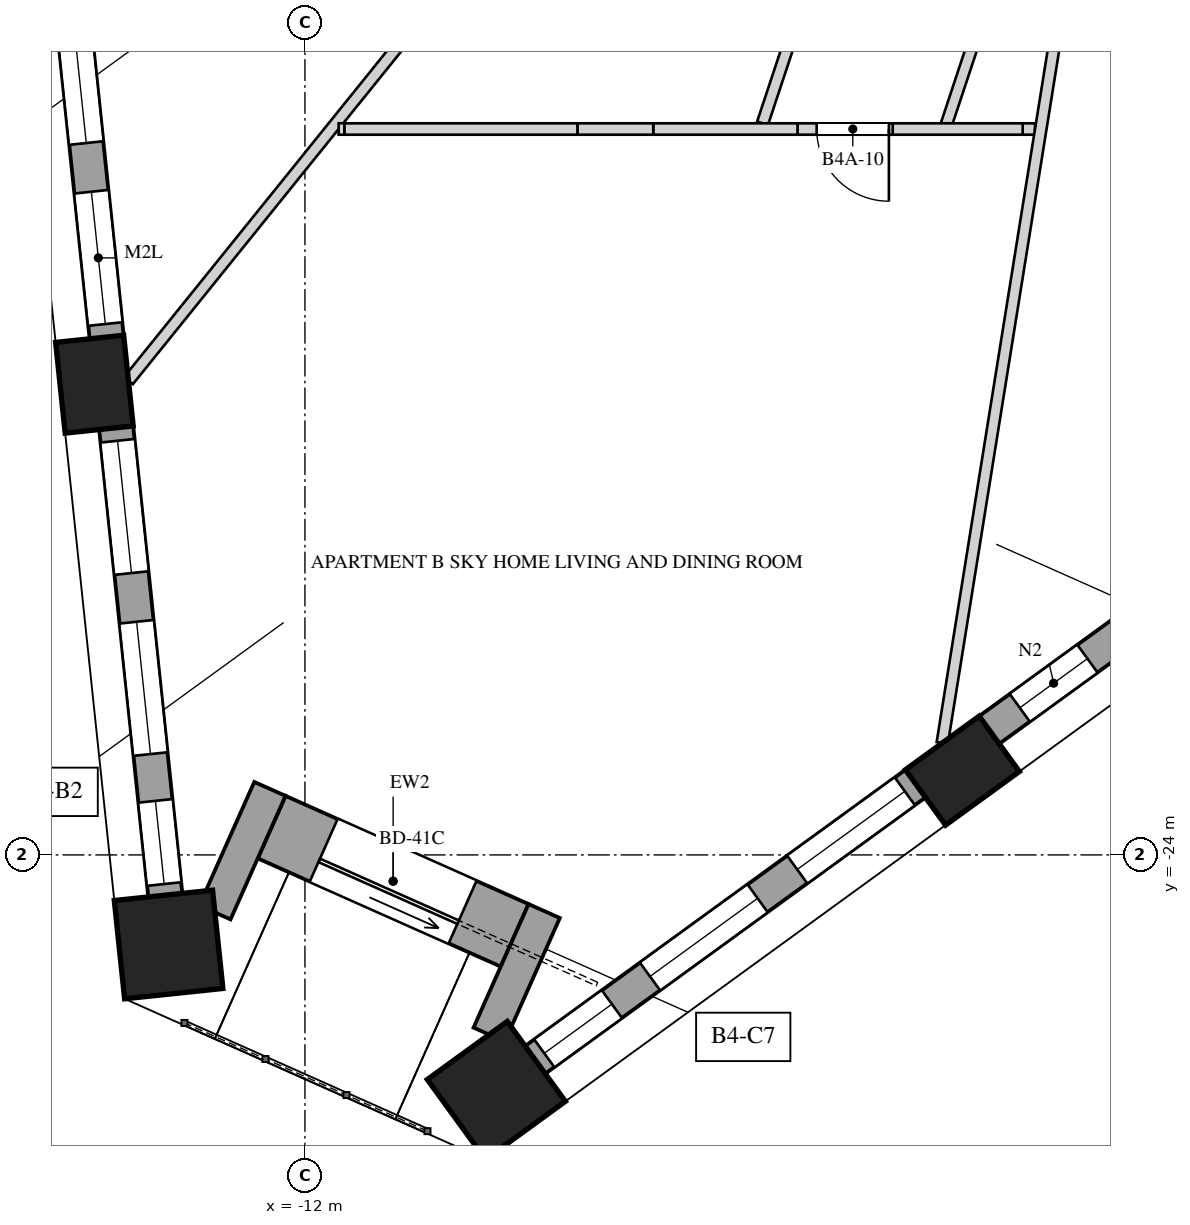
"""IFC4 building model, lengths in metres.
Left out: names, types, materials, properties, quantities, classifications, styles, units other than length and angle.
Written with IfcOpenShell. Run it as: python <this file> out.ifc"""

import sys

from ifc_helpers import new_model, si_unit, direction, frame, frame_2d, origin, origin_2d, place, context, subcontext, project, spatial, polyline, rectangle, outline, extrude, element, fill, save


model = new_model("IFC4")
c1 = context("Model", 3, precision=1e-05, world=origin(), true_north=direction((0.0, 1.0)))
c2 = subcontext(c1, "Body", "Model", "MODEL_VIEW")
j1 = project(units=[si_unit("LENGTHUNIT", "METRE"), si_unit("PLANEANGLEUNIT", "RADIAN")], contexts=[c1])
p1 = place(None, origin())
s1 = spatial("IfcSite", under=j1, at=p1, CompositionType="ELEMENT")
p2 = place(p1, origin())
s2 = spatial("IfcBuilding", under=s1, at=p2, CompositionType="ELEMENT")
p3 = place(p2, frame((0.0, 0.0, 162.8)))
s3 = spatial("IfcBuildingStorey", under=s2, at=p3, CompositionType="ELEMENT", Elevation=162.8)
p4 = place(p3, frame((-14.77, -17.807, -0.35), z_axis=(0.0, 0.0, 1.0), x_axis=(0.104528463268, -0.994521895368, 0.0)))
e1 = element("IfcColumn", 1, at=p4, inside=s3, PredefinedType="COLUMN", context=c2, shape_type="SweptSolid", body=[
    extrude(rectangle(XDim=1.2, YDim=0.9, at=origin_2d()), origin(), (0.0, 0.0, 1.0), 4.35),
])
for number, where, z_axis, x_axis in (
    (2, (-13.794, -25.178, -0.35), (0.0, 0.0, 1.0), (0.105, -0.995, 0.0)),
    (3, (-9.481, -27.098, -0.35), (0.0, 0.0, 1.0), (0.809, 0.588, 0.0)),
):
    element("IfcColumn", number, at=place(p3, frame(where, z_axis=z_axis, x_axis=x_axis)), inside=s3, PredefinedType="COLUMN", context=c2, shape_type="SweptSolid", body=[
        extrude(rectangle(XDim=1.3, YDim=1.3, at=origin_2d()), origin(), (0.0, 0.0, 1.0), 4.35),
    ])
p5 = place(p3, frame((-3.351, -22.891, -0.35), z_axis=(0.0, 0.0, 1.0), x_axis=(0.809016994375, 0.587785252292, 0.0)))
e4 = element("IfcColumn", 4, at=p5, inside=s3, PredefinedType="COLUMN", context=c2, shape_type="SweptSolid", body=[
    extrude(rectangle(XDim=1.2, YDim=0.9, at=origin_2d()), origin(), (0.0, 0.0, 1.0), 4.35),
])
p6 = place(p3, frame((-15.328, -10.342, 0.0), z_axis=(0.0, 0.0, 1.0), x_axis=(0.104531531326, -0.994521572898, 0.0)))
e5 = element("IfcWall", 5, at=p6, inside=s3, PredefinedType="SOLIDWALL", context=c2, shape_type="SweptSolid", body=[
    extrude(rectangle(XDim=6.883, YDim=0.45, at=frame_2d((3.441, 0.0))), origin(), (0.0, 0.0, 1.0), 3.3),
])
p7 = place(p6, frame((0.172, 0.0, 0.5)))
e6 = element("IfcOpeningElement", 6, at=p7, cuts=e5, PredefinedType="OPENING", context=c2, shape_type="SweptSolid", body=[
    extrude(rectangle(XDim=1.75, YDim=2.65, at=frame_2d((0.875, 1.325))), frame((0.0, 0.235, 0.0), z_axis=(0.0, -1.0, 0.0), x_axis=(1.0, 0.0, 0.0)), (0.0, 0.0, 1.0), 0.47),
])
p8 = place(p6, frame((2.566, 0.0, 0.5)))
e7 = element("IfcOpeningElement", 7, at=p8, cuts=e5, PredefinedType="OPENING", context=c2, shape_type="SweptSolid", body=[
    extrude(rectangle(XDim=1.75, YDim=2.65, at=frame_2d((0.875, 1.325))), frame((0.0, 0.235, 0.0), z_axis=(0.0, -1.0, 0.0), x_axis=(1.0, 0.0, 0.0)), (0.0, 0.0, 1.0), 0.47),
])
p9 = place(p6, frame((4.961, 0.0, 0.5)))
e8 = element("IfcOpeningElement", 8, at=p9, cuts=e5, PredefinedType="OPENING", context=c2, shape_type="SweptSolid", body=[
    extrude(rectangle(XDim=1.75, YDim=2.0, at=frame_2d((0.875, 1.0))), frame((0.0, 0.235, 0.0), z_axis=(0.0, -1.0, 0.0), x_axis=(1.0, 0.0, 0.0)), (0.0, 0.0, 1.0), 0.47),
])
p10 = place(p3, frame((-14.483, -18.38, 0.0), z_axis=(0.0, 0.0, 1.0), x_axis=(0.104557348575, -0.994518858976, 0.0)))
e9 = element("IfcWall", 9, at=p10, inside=s3, PredefinedType="SOLIDWALL", context=c2, shape_type="SweptSolid", body=[
    extrude(rectangle(XDim=6.183, YDim=0.45, at=frame_2d((3.092, 0.0))), origin(), (0.0, 0.0, 1.0), 3.3),
])
p11 = place(p10, frame((0.172, 0.0, 0.5)))
e10 = element("IfcOpeningElement", 10, at=p11, cuts=e9, PredefinedType="OPENING", context=c2, shape_type="SweptSolid", body=[
    extrude(rectangle(XDim=1.75, YDim=2.65, at=frame_2d((0.875, 1.325))), frame((0.0, 0.235, 0.0), z_axis=(0.0, -1.0, 0.0), x_axis=(1.0, 0.0, 0.0)), (0.0, 0.0, 1.0), 0.47),
])
p12 = place(p10, frame((2.566, 0.0, 0.5)))
e11 = element("IfcOpeningElement", 11, at=p12, cuts=e9, PredefinedType="OPENING", context=c2, shape_type="SweptSolid", body=[
    extrude(rectangle(XDim=1.75, YDim=2.65, at=frame_2d((0.875, 1.325))), frame((0.0, 0.235, 0.0), z_axis=(0.0, -1.0, 0.0), x_axis=(1.0, 0.0, 0.0)), (0.0, 0.0, 1.0), 0.47),
])
p13 = place(p10, frame((4.936, 0.0, 0.5)))
e12 = element("IfcOpeningElement", 12, at=p13, cuts=e9, PredefinedType="OPENING", context=c2, shape_type="SweptSolid", body=[
    extrude(rectangle(XDim=1.1, YDim=2.0, at=frame_2d((0.55, 1.0))), frame((0.0, 0.235, 0.0), z_axis=(0.0, -1.0, 0.0), x_axis=(1.0, 0.0, 0.0)), (0.0, 0.0, 1.0), 0.47),
])
p14 = place(p3, frame((-8.97, -26.696, 0.0), z_axis=(0.0, 0.0, 1.0), x_axis=(0.809024567544, 0.587774828578, 0.0)))
e13 = element("IfcWall", 13, at=p14, inside=s3, PredefinedType="SOLIDWALL", context=c2, shape_type="SweptSolid", body=[
    extrude(rectangle(XDim=6.183, YDim=0.45, at=frame_2d((3.091, 0.0))), origin(), (0.0, 0.0, 1.0), 3.3),
])
p15 = place(p14, frame((0.147, 0.0, 0.5)))
e14 = element("IfcOpeningElement", 14, at=p15, cuts=e13, PredefinedType="OPENING", context=c2, shape_type="SweptSolid", body=[
    extrude(rectangle(XDim=1.1, YDim=2.0, at=frame_2d((0.55, 1.0))), frame((0.0, 0.235, 0.0), z_axis=(0.0, -1.0, 0.0), x_axis=(1.0, 0.0, 0.0)), (0.0, 0.0, 1.0), 0.47),
])
p16 = place(p14, frame((1.866, 0.0, 0.5)))
e15 = element("IfcOpeningElement", 15, at=p16, cuts=e13, PredefinedType="OPENING", context=c2, shape_type="SweptSolid", body=[
    extrude(rectangle(XDim=1.75, YDim=2.65, at=frame_2d((0.875, 1.325))), frame((0.0, 0.235, 0.0), z_axis=(0.0, -1.0, 0.0), x_axis=(1.0, 0.0, 0.0)), (0.0, 0.0, 1.0), 0.47),
])
p17 = place(p14, frame((4.261, 0.0, 0.5)))
e16 = element("IfcOpeningElement", 16, at=p17, cuts=e13, PredefinedType="OPENING", context=c2, shape_type="SweptSolid", body=[
    extrude(rectangle(XDim=1.75, YDim=2.65, at=frame_2d((0.875, 1.325))), frame((0.0, 0.235, 0.0), z_axis=(0.0, -1.0, 0.0), x_axis=(1.0, 0.0, 0.0)), (0.0, 0.0, 1.0), 0.47),
])
p18 = place(p3, frame((-2.997, -22.356, 0.0), z_axis=(0.0, 0.0, 1.0), x_axis=(0.809016690404, 0.587785670672, 0.0)))
e17 = element("IfcWall", 17, at=p18, inside=s3, PredefinedType="SOLIDWALL", context=c2, shape_type="SweptSolid", body=[
    extrude(rectangle(XDim=6.883, YDim=0.45, at=frame_2d((3.441, 0.0))), origin(), (0.0, 0.0, 1.0), 3.3),
])
p19 = place(p18, frame((0.497, 0.0, 0.5)))
e18 = element("IfcOpeningElement", 18, at=p19, cuts=e17, PredefinedType="OPENING", context=c2, shape_type="SweptSolid", body=[
    extrude(rectangle(XDim=1.1, YDim=2.65, at=frame_2d((0.55, 1.325))), frame((0.0, 0.235, 0.0), z_axis=(0.0, -1.0, 0.0), x_axis=(1.0, 0.0, 0.0)), (0.0, 0.0, 1.0), 0.47),
])
p20 = place(p18, frame((2.566, 0.0, 0.5)))
e19 = element("IfcOpeningElement", 19, at=p20, cuts=e17, PredefinedType="OPENING", context=c2, shape_type="SweptSolid", body=[
    extrude(rectangle(XDim=1.75, YDim=2.65, at=frame_2d((0.875, 1.325))), frame((0.0, 0.235, 0.0), z_axis=(0.0, -1.0, 0.0), x_axis=(1.0, 0.0, 0.0)), (0.0, 0.0, 1.0), 0.47),
])
p21 = place(p18, frame((4.961, 0.0, 0.5)))
e20 = element("IfcOpeningElement", 20, at=p21, cuts=e17, PredefinedType="OPENING", context=c2, shape_type="SweptSolid", body=[
    extrude(rectangle(XDim=1.75, YDim=2.65, at=frame_2d((0.875, 1.325))), frame((0.0, 0.235, 0.0), z_axis=(0.0, -1.0, 0.0), x_axis=(1.0, 0.0, 0.0)), (0.0, 0.0, 1.0), 0.47),
])
p22 = place(p3, frame((-9.241, -25.058, 0.0), z_axis=(0.0, 0.0, 1.0), x_axis=(-0.913549606868, 0.406727323635, 0.0)))
e21 = element("IfcWall", 21, at=p22, inside=s3, PredefinedType="SOLIDWALL", context=c2, shape_type="SweptSolid", body=[
    extrude(rectangle(XDim=3.5, YDim=0.9, at=frame_2d((1.75, 0.0))), origin(), (0.0, 0.0, 1.0), 3.3),
])
p23 = place(p22, frame((0.75, 0.0, 0.0)))
e22 = element("IfcOpeningElement", 22, at=p23, cuts=e21, PredefinedType="OPENING", context=c2, shape_type="SweptSolid", body=[
    extrude(rectangle(XDim=2.0, YDim=2.4, at=frame_2d((1.0, 1.2))), frame((0.0, 0.46, 0.0), z_axis=(0.0, -1.0, 0.0), x_axis=(1.0, 0.0, 0.0)), (0.0, 0.0, 1.0), 0.92),
])
p24 = place(p3, frame((-9.576, -26.364, 0.0), z_axis=(0.0, 0.0, 1.0), x_axis=(0.406749543613, 0.913539713844, 0.0)))
e23 = element("IfcWall", 23, at=p24, inside=s3, PredefinedType="SOLIDWALL", context=c2, shape_type="SweptSolid", body=[
    extrude(rectangle(XDim=1.779, YDim=0.45, at=frame_2d((0.89, 0.0))), origin(), (0.0, 0.0, 1.0), 2.55),
])
p25 = place(p3, frame((-13.184, -24.757, 0.0), z_axis=(0.0, 0.0, 1.0), x_axis=(0.406698557215, 0.913562413609, 0.0)))
e24 = element("IfcWall", 24, at=p25, inside=s3, PredefinedType="SOLIDWALL", context=c2, shape_type="SweptSolid", body=[
    extrude(rectangle(XDim=1.779, YDim=0.45, at=frame_2d((0.89, 0.0))), origin(), (0.0, 0.0, 1.0), 2.55),
])
p26 = place(p3, frame((-14.322, -17.76, 0.0), z_axis=(0.0, 0.0, 1.0), x_axis=(0.627722219301, 0.778437419062, 0.0)))
e25 = element("IfcWall", 25, at=p26, inside=s3, PredefinedType="PARTITIONING", context=c2, shape_type="SweptSolid", body=[
    extrude(rectangle(XDim=8.524, YDim=0.15, at=frame_2d((4.262, 0.0))), origin(), (0.0, 0.0, 1.0), 2.75),
])
p27 = place(p3, frame((-5.979, -14.375, 0.0), z_axis=(0.0, 0.0, 1.0), x_axis=(0.314824942326, 0.94914975409, 0.0)))
e26 = element("IfcWall", 26, at=p27, inside=s3, PredefinedType="PARTITIONING", context=c2, shape_type="SweptSolid", body=[
    extrude(rectangle(XDim=3.499, YDim=0.15, at=frame_2d((1.75, 0.0))), origin(), (0.0, 0.0, 1.0), 3.65),
])
p28 = place(p3, frame((-2.454, -11.052, 0.0), z_axis=(0.0, 0.0, 1.0), x_axis=(-0.314794041052, -0.949160003223, 0.0)))
e27 = element("IfcWall", 27, at=p28, inside=s3, PredefinedType="PARTITIONING", context=c2, shape_type="SweptSolid", body=[
    extrude(rectangle(XDim=3.577, YDim=0.15, at=frame_2d((1.789, 0.0))), origin(), (0.0, 0.0, 1.0), 3.65),
])
p29 = place(p28, frame((1.364, 0.0, 0.0)))
e28 = element("IfcOpeningElement", 28, at=p29, cuts=e27, PredefinedType="OPENING", context=c2, shape_type="SweptSolid", body=[
    extrude(rectangle(XDim=0.85, YDim=2.4, at=frame_2d((0.425, 1.2))), frame((0.0, 0.085, 0.0), z_axis=(0.0, -1.0, 0.0), x_axis=(1.0, 0.0, 0.0)), (0.0, 0.0, 1.0), 0.17),
])
p30 = place(p3, frame((-2.395, -14.45, 0.0), z_axis=(0.0, 0.0, 1.0), x_axis=(-1.0, 0.0, 0.0)))
e29 = element("IfcWall", 29, at=p30, inside=s3, PredefinedType="PARTITIONING", context=c2, shape_type="SweptSolid", body=[
    extrude(rectangle(XDim=0.162, YDim=0.15, at=frame_2d((0.081, 0.0))), origin(), (0.0, 0.0, 1.0), 2.55),
])
p31 = place(p3, frame((-2.557, -14.45, 0.0), z_axis=(0.0, 0.0, 1.0), x_axis=(-1.0, 0.0, 0.0)))
e30 = element("IfcWall", 30, at=p31, inside=s3, PredefinedType="PARTITIONING", context=c2, shape_type="SweptSolid", body=[
    extrude(rectangle(XDim=1.71, YDim=0.15, at=frame_2d((0.855, 0.0))), origin(), (0.0, 0.0, 1.0), 3.65),
])
p32 = place(p3, frame((-4.267, -14.45, 0.0), z_axis=(0.0, 0.0, 1.0), x_axis=(-1.0, 0.0, 0.0)))
e31 = element("IfcWall", 31, at=p32, inside=s3, PredefinedType="PARTITIONING", context=c2, shape_type="SweptSolid", body=[
    extrude(outline(polyline([(0.0, 0.0), (1.252, 0.0), (1.252, 2.55), (0.325, 2.55), (0.325, 3.65), (0.0, 3.65), (0.0, 0.0)])), frame((0.0, 0.075, 0.0), z_axis=(0.0, -1.0, 0.0), x_axis=(1.0, 0.0, 0.0)), (0.0, 0.0, 1.0), 0.15),
])
p33 = place(p32, frame((0.05, 0.0, 0.0)))
e32 = element("IfcOpeningElement", 32, at=p33, cuts=e31, PredefinedType="OPENING", context=c2, shape_type="SweptSolid", body=[
    extrude(rectangle(XDim=0.95, YDim=2.4, at=frame_2d((0.475, 1.2))), frame((0.0, 0.085, 0.0), z_axis=(0.0, -1.0, 0.0), x_axis=(1.0, 0.0, 0.0)), (0.0, 0.0, 1.0), 0.17),
])
p34 = place(p3, frame((-5.52, -14.45, 0.0), z_axis=(0.0, 0.0, 1.0), x_axis=(-1.0, 0.0, 0.0)))
e33 = element("IfcWall", 33, at=p34, inside=s3, PredefinedType="PARTITIONING", context=c2, shape_type="SweptSolid", body=[
    extrude(rectangle(XDim=1.898, YDim=0.15, at=frame_2d((0.949, 0.0))), origin(), (0.0, 0.0, 1.0), 3.65),
])
p35 = place(p3, frame((-7.417, -14.45, 0.0), z_axis=(0.0, 0.0, 1.0), x_axis=(-1.0, 0.0, 0.0)))
e34 = element("IfcWall", 34, at=p35, inside=s3, PredefinedType="PARTITIONING", context=c2, shape_type="SweptSolid", body=[
    extrude(rectangle(XDim=0.998, YDim=0.15, at=frame_2d((0.499, 0.0))), origin(), (0.0, 0.0, 1.0), 2.55),
])
p36 = place(p3, frame((-8.415, -14.45, 0.0), z_axis=(0.0, 0.0, 1.0), x_axis=(-1.0, 0.0, 0.0)))
e35 = element("IfcWall", 35, at=p36, inside=s3, PredefinedType="PARTITIONING", context=c2, shape_type="SweptSolid", body=[
    extrude(rectangle(XDim=3.067, YDim=0.15, at=frame_2d((1.533, 0.0))), origin(), (0.0, 0.0, 1.0), 3.65),
])
p37 = place(p3, frame((-11.482, -14.45, 0.0), z_axis=(0.0, 0.0, 1.0), x_axis=(-1.0, 0.0, 0.0)))
e36 = element("IfcWall", 36, at=p37, inside=s3, PredefinedType="PARTITIONING", context=c2, shape_type="SweptSolid", body=[
    extrude(rectangle(XDim=0.075, YDim=0.15, at=frame_2d((0.037, 0.0))), origin(), (0.0, 0.0, 1.0), 2.75),
])
p38 = place(p3, frame((-1.785, -11.125, 0.0), z_axis=(0.0, 0.0, 1.0), x_axis=(-0.158434092998, -0.987369555018, 0.0)))
e37 = element("IfcWall", 37, at=p38, inside=s3, PredefinedType="PARTITIONING", context=c2, shape_type="SweptSolid", body=[
    extrude(rectangle(XDim=11.548, YDim=0.15, at=frame_2d((5.774, 0.0))), origin(), (0.0, 0.0, 1.0), 2.55),
])
p39 = place(p8, origin())
e38 = element("IfcWindow", 38, at=p39, inside=s3, PartitioningType="SINGLE_PANEL", PredefinedType="WINDOW", context=c2, shape_type="SweptSolid", body=[
    extrude(rectangle(XDim=1.75, YDim=2.65, at=frame_2d((0.875, 1.325))), frame((0.0, 0.03, 0.0), z_axis=(0.0, -1.0, 0.0), x_axis=(1.0, 0.0, 0.0)), (0.0, 0.0, 1.0), 0.06),
])
fill(e7, e38)
p40 = place(p9, origin())
e39 = element("IfcWindow", 39, at=p40, inside=s3, PartitioningType="SINGLE_PANEL", PredefinedType="WINDOW", context=c2, shape_type="SweptSolid", body=[
    extrude(rectangle(XDim=1.75, YDim=2.0, at=frame_2d((0.875, 1.0))), frame((0.0, 0.03, 0.0), z_axis=(0.0, -1.0, 0.0), x_axis=(1.0, 0.0, 0.0)), (0.0, 0.0, 1.0), 0.06),
])
fill(e8, e39)
p41 = place(p11, origin())
e40 = element("IfcWindow", 40, at=p41, inside=s3, PartitioningType="SINGLE_PANEL", PredefinedType="WINDOW", context=c2, shape_type="SweptSolid", body=[
    extrude(rectangle(XDim=1.75, YDim=2.65, at=frame_2d((0.875, 1.325))), frame((0.0, 0.03, 0.0), z_axis=(0.0, -1.0, 0.0), x_axis=(1.0, 0.0, 0.0)), (0.0, 0.0, 1.0), 0.06),
])
fill(e10, e40)
p42 = place(p12, origin())
e41 = element("IfcWindow", 41, at=p42, inside=s3, PartitioningType="SINGLE_PANEL", PredefinedType="WINDOW", context=c2, shape_type="SweptSolid", body=[
    extrude(rectangle(XDim=1.75, YDim=2.65, at=frame_2d((0.875, 1.325))), frame((0.0, 0.03, 0.0), z_axis=(0.0, -1.0, 0.0), x_axis=(1.0, 0.0, 0.0)), (0.0, 0.0, 1.0), 0.06),
])
fill(e11, e41)
p43 = place(p13, origin())
e42 = element("IfcWindow", 42, at=p43, inside=s3, PartitioningType="SINGLE_PANEL", PredefinedType="WINDOW", context=c2, shape_type="SweptSolid", body=[
    extrude(rectangle(XDim=1.1, YDim=2.0, at=frame_2d((0.55, 1.0))), frame((0.0, 0.03, 0.0), z_axis=(0.0, -1.0, 0.0), x_axis=(1.0, 0.0, 0.0)), (0.0, 0.0, 1.0), 0.06),
])
fill(e12, e42)
p44 = place(p15, origin())
e43 = element("IfcWindow", 43, at=p44, inside=s3, PartitioningType="SINGLE_PANEL", PredefinedType="WINDOW", context=c2, shape_type="SweptSolid", body=[
    extrude(rectangle(XDim=1.1, YDim=2.0, at=frame_2d((0.55, 1.0))), frame((0.0, 0.03, 0.0), z_axis=(0.0, -1.0, 0.0), x_axis=(1.0, 0.0, 0.0)), (0.0, 0.0, 1.0), 0.06),
])
fill(e14, e43)
p45 = place(p16, origin())
e44 = element("IfcWindow", 44, at=p45, inside=s3, PartitioningType="SINGLE_PANEL", PredefinedType="WINDOW", context=c2, shape_type="SweptSolid", body=[
    extrude(rectangle(XDim=1.75, YDim=2.65, at=frame_2d((0.875, 1.325))), frame((0.0, 0.03, 0.0), z_axis=(0.0, -1.0, 0.0), x_axis=(1.0, 0.0, 0.0)), (0.0, 0.0, 1.0), 0.06),
])
fill(e15, e44)
p46 = place(p17, origin())
e45 = element("IfcWindow", 45, at=p46, inside=s3, PartitioningType="SINGLE_PANEL", PredefinedType="WINDOW", context=c2, shape_type="SweptSolid", body=[
    extrude(rectangle(XDim=1.75, YDim=2.65, at=frame_2d((0.875, 1.325))), frame((0.0, 0.03, 0.0), z_axis=(0.0, -1.0, 0.0), x_axis=(1.0, 0.0, 0.0)), (0.0, 0.0, 1.0), 0.06),
])
fill(e16, e45)
p47 = place(p19, origin())
e46 = element("IfcWindow", 46, at=p47, inside=s3, PartitioningType="SINGLE_PANEL", PredefinedType="WINDOW", context=c2, shape_type="SweptSolid", body=[
    extrude(rectangle(XDim=1.1, YDim=2.65, at=frame_2d((0.55, 1.325))), frame((0.0, 0.03, 0.0), z_axis=(0.0, -1.0, 0.0), x_axis=(1.0, 0.0, 0.0)), (0.0, 0.0, 1.0), 0.06),
])
fill(e18, e46)
p48 = place(p23, origin())
e47 = element("IfcDoor", 47, at=p48, inside=s3, OperationType="SLIDING_TO_LEFT", PredefinedType="DOOR", context=c2, shape_type="SweptSolid", body=[
    extrude(rectangle(XDim=2.0, YDim=2.4, at=frame_2d((1.0, 1.2))), frame((0.0, 0.025, 0.0), z_axis=(0.0, -1.0, 0.0), x_axis=(1.0, 0.0, 0.0)), (0.0, 0.0, 1.0), 0.05),
])
fill(e22, e47)
p49 = place(p33, origin())
e48 = element("IfcDoor", 48, at=p49, inside=s3, OperationType="SINGLE_SWING_RIGHT", PredefinedType="DOOR", context=c2, shape_type="SweptSolid", body=[
    extrude(rectangle(XDim=0.95, YDim=2.4, at=frame_2d((0.475, 1.2))), frame((0.0, 0.025, 0.0), z_axis=(0.0, -1.0, 0.0), x_axis=(1.0, 0.0, 0.0)), (0.0, 0.0, 1.0), 0.05),
])
fill(e32, e48)
save(model, sys.argv[1])
